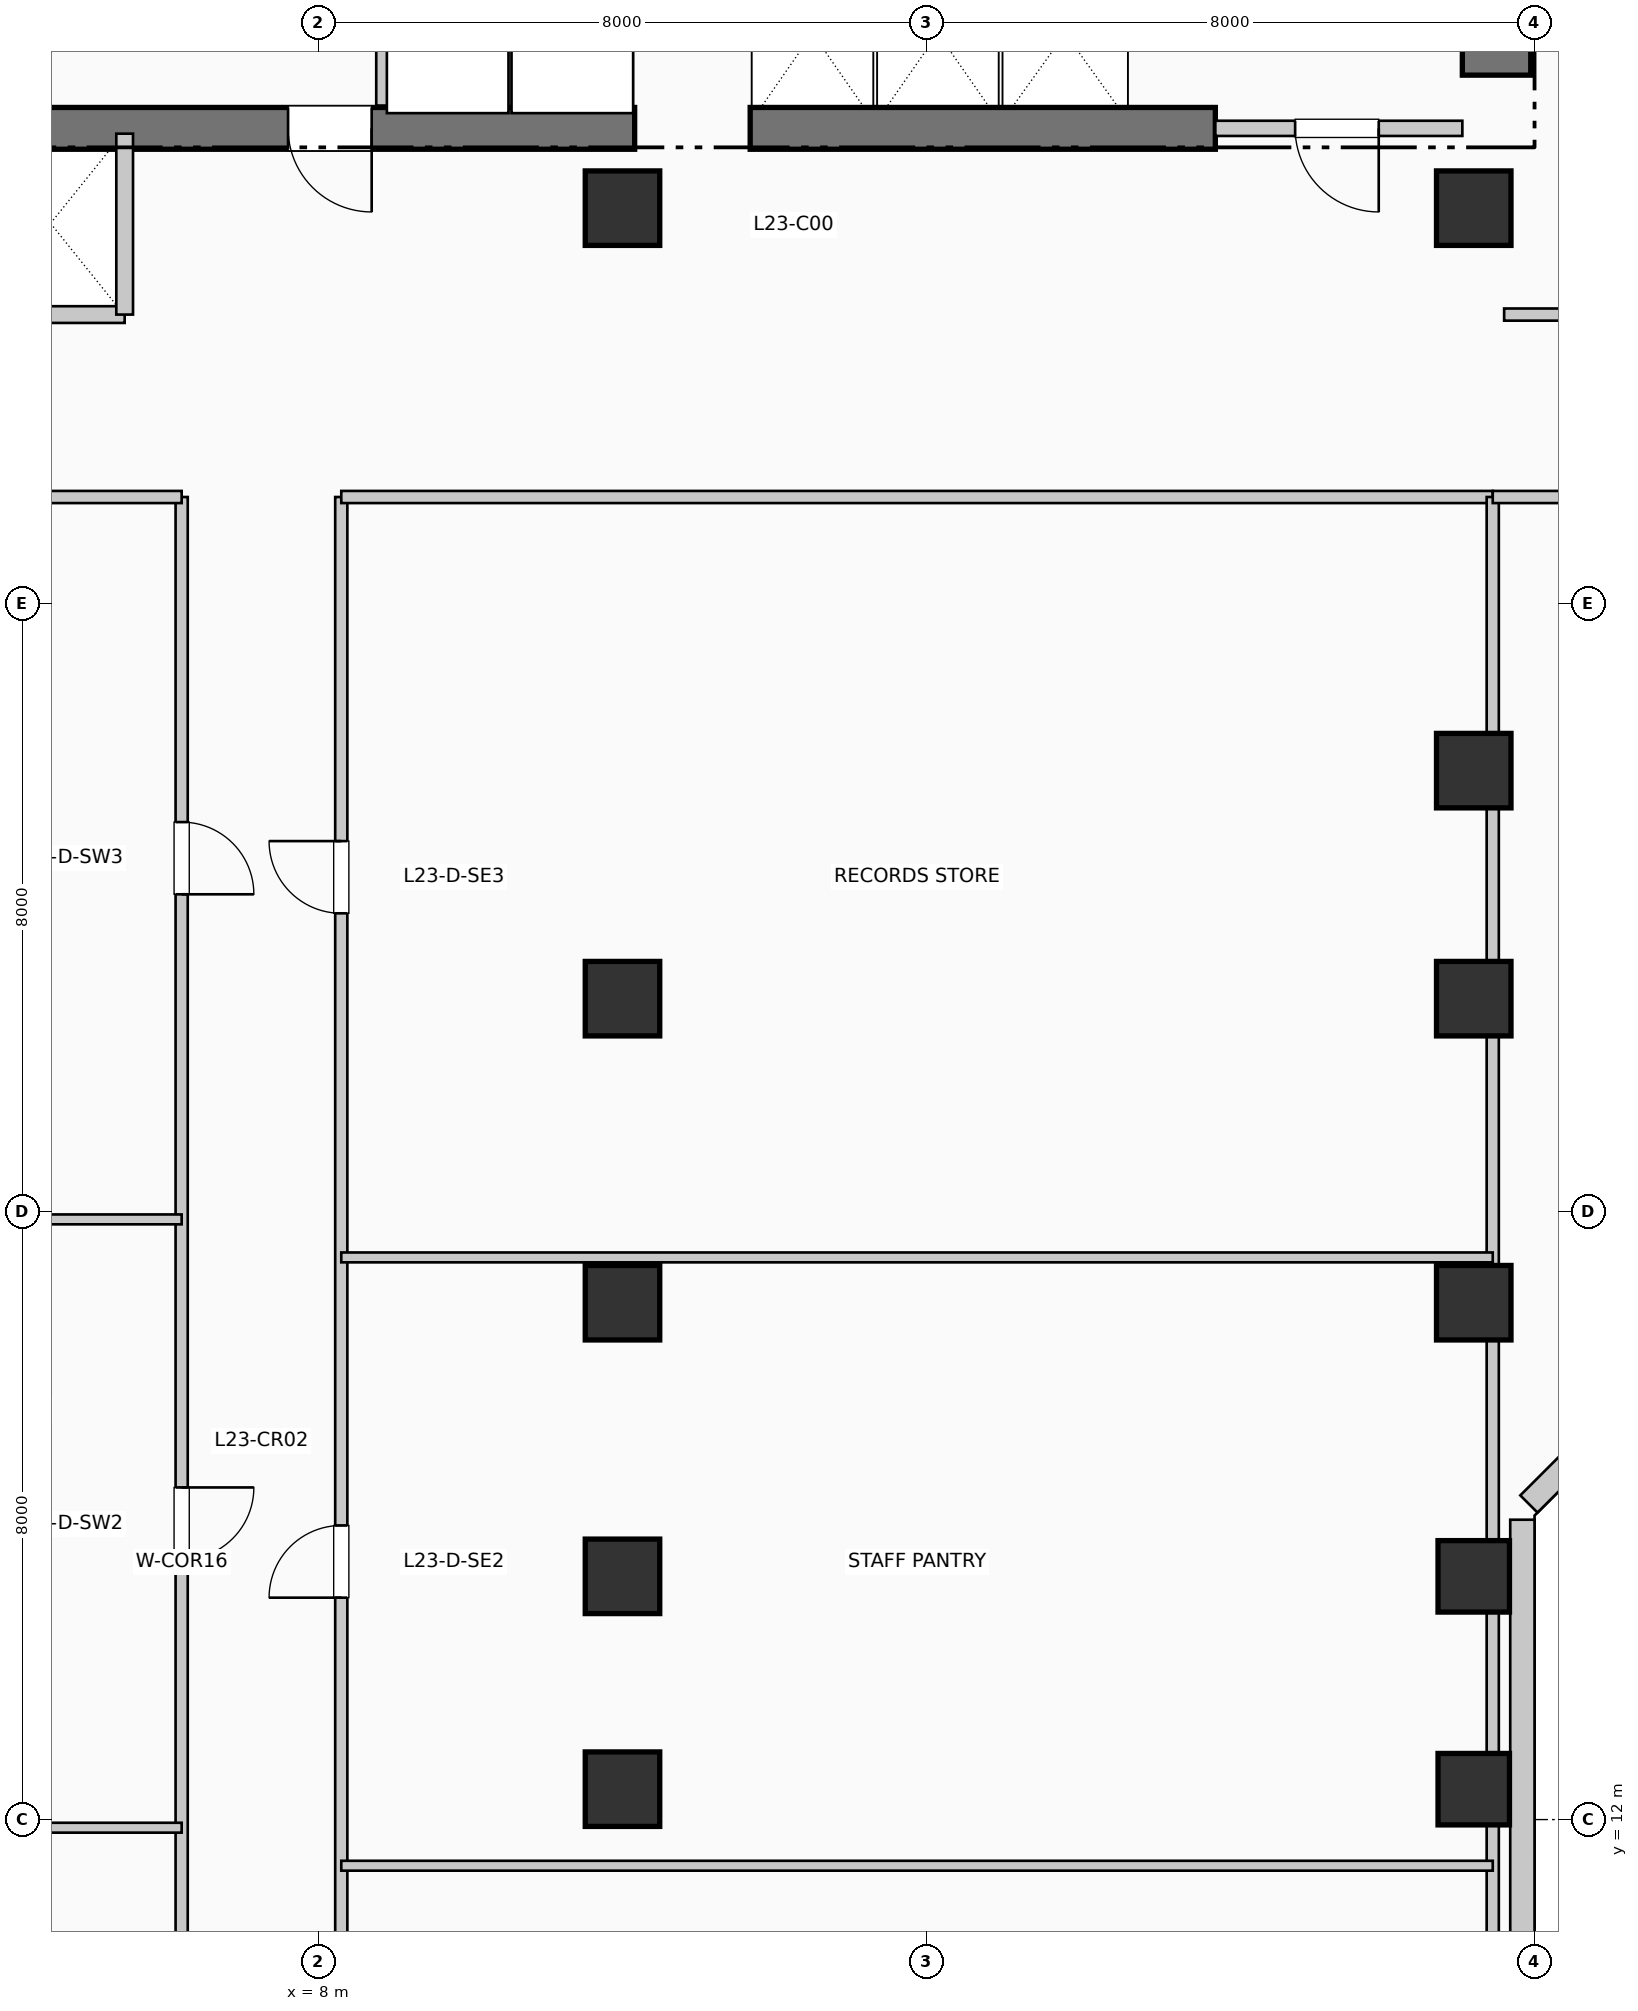
"""IFC4 building model, lengths in metres.
Left out: names, types, materials, properties, quantities, classifications, styles, units other than length and angle.
Written with IfcOpenShell. Run it as: python <this file> out.ifc"""

import sys

from ifc_helpers import new_model, si_unit, direction, frame, frame_2d, origin, origin_2d, place, context, subcontext, project, spatial, rectangle, extrude, element, fill, save


model = new_model("IFC4")
c1 = context("Model", 3, precision=1e-05, world=origin(), true_north=direction((0.0, 1.0)))
c2 = subcontext(c1, "Body", "Model", "MODEL_VIEW")
j1 = project(units=[si_unit("LENGTHUNIT", "METRE"), si_unit("PLANEANGLEUNIT", "RADIAN")], contexts=[c1])
p1 = place(None, origin())
s1 = spatial("IfcSite", under=j1, at=p1, CompositionType="ELEMENT")
p2 = place(p1, origin())
s2 = spatial("IfcBuilding", under=s1, at=p2, CompositionType="ELEMENT")
p3 = place(p2, frame((0.0, 0.0, 98.67)))
s3 = spatial("IfcBuildingStorey", under=s2, at=p3, CompositionType="ELEMENT", Elevation=98.67)
p4 = place(p3, frame((23.5, 34.95, 0.0), z_axis=(0.0, 0.0, 1.0), x_axis=(0.0, 1.0, 0.0)))
e1 = element("IfcWall", 1, at=p4, inside=s3, PredefinedType="SHEAR", context=c2, shape_type="SweptSolid", body=[
    extrude(rectangle(XDim=10.64, YDim=0.9, at=frame_2d((5.32, 0.0))), origin(), (0.0, 0.0, 1.0), 3.96),
])
p5 = place(p3, frame((1.45, 34.25, 0.0), z_axis=(0.0, 0.0, 1.0), x_axis=(1.0, 0.0, 0.0)))
e2 = element("IfcWall", 2, at=p5, inside=s3, PredefinedType="SHEAR", context=c2, shape_type="SweptSolid", body=[
    extrude(rectangle(XDim=10.71, YDim=0.55, at=frame_2d((5.355, 0.0))), origin(), (0.0, 0.0, 1.0), 3.96),
])
p6 = place(p5, frame((7.25, 0.0, 0.0), z_axis=(0.0, 0.0, 1.0), x_axis=(-1.0, 0.0, 0.0)))
e3 = element("IfcOpeningElement", 3, at=p6, cuts=e2, PredefinedType="OPENING", context=c2, shape_type="SweptSolid", body=[
    extrude(rectangle(XDim=1.1, YDim=2.15, at=frame_2d((0.55, 1.075))), frame((0.0, 0.285, 0.0), z_axis=(0.0, -1.0, 0.0), x_axis=(1.0, 0.0, 0.0)), (0.0, 0.0, 1.0), 0.57),
])
p7 = place(p3, frame((13.68, 34.25, 0.0), z_axis=(0.0, 0.0, 1.0), x_axis=(1.0, 0.0, 0.0)))
e4 = element("IfcWall", 4, at=p7, inside=s3, PredefinedType="SHEAR", context=c2, shape_type="SweptSolid", body=[
    extrude(rectangle(XDim=6.12, YDim=0.55, at=frame_2d((3.06, 0.0))), origin(), (0.0, 0.0, 1.0), 3.96),
])
for number, where, z_axis, x_axis in (
    (5, (12.0, 12.4, 0.0), (0.0, 0.0, 1.0), (1.0, 0.0, 0.0)),
    (6, (12.0, 15.2, 0.0), (0.0, 0.0, 1.0), (1.0, 0.0, 0.0)),
    (7, (12.0, 18.8, 0.0), (0.0, 0.0, 1.0), (1.0, 0.0, 0.0)),
    (8, (12.0, 22.8, 0.0), (0.0, 0.0, 1.0), (1.0, 0.0, 0.0)),
    (9, (12.0, 33.2, 0.0), (0.0, 0.0, 1.0), (1.0, 0.0, 0.0)),
):
    element("IfcColumn", number, at=place(p3, frame(where, z_axis=z_axis, x_axis=x_axis)), inside=s3, PredefinedType="COLUMN", context=c2, shape_type="SweptSolid", body=[
        extrude(rectangle(XDim=0.98, YDim=0.98, at=origin_2d()), origin(), (0.0, 0.0, 1.0), 3.96),
    ])
for number, where, z_axis, x_axis in (
    (10, (23.2, 12.4, 0.0), (0.0, 0.0, 1.0), (1.0, 0.0, 0.0)),
    (11, (23.2, 15.2, 0.0), (0.0, 0.0, 1.0), (1.0, 0.0, 0.0)),
):
    element("IfcColumn", number, at=place(p3, frame(where, z_axis=z_axis, x_axis=x_axis)), inside=s3, PredefinedType="COLUMN", context=c2, shape_type="SweptSolid", body=[
        extrude(rectangle(XDim=0.94, YDim=0.94, at=origin_2d()), origin(), (0.0, 0.0, 1.0), 3.96),
    ])
for number, where, z_axis, x_axis in (
    (12, (23.2, 18.8, 0.0), (0.0, 0.0, 1.0), (1.0, 0.0, 0.0)),
    (13, (23.2, 22.8, 0.0), (0.0, 0.0, 1.0), (1.0, 0.0, 0.0)),
    (14, (23.2, 25.8, 0.0), (0.0, 0.0, 1.0), (1.0, 0.0, 0.0)),
    (15, (23.2, 33.2, 0.0), (0.0, 0.0, 1.0), (1.0, 0.0, 0.0)),
):
    element("IfcColumn", number, at=place(p3, frame(where, z_axis=z_axis, x_axis=x_axis)), inside=s3, PredefinedType="COLUMN", context=c2, shape_type="SweptSolid", body=[
        extrude(rectangle(XDim=0.98, YDim=0.98, at=origin_2d()), origin(), (0.0, 0.0, 1.0), 3.96),
    ])
p8 = place(p3, frame((23.84, 3.055, 0.0), z_axis=(0.0, 0.0, 1.0), x_axis=(0.0, 1.0, 0.0)))
e16 = element("IfcWall", 16, at=p8, inside=s3, PredefinedType="SOLIDWALL", context=c2, shape_type="SweptSolid", body=[
    extrude(rectangle(XDim=12.89, YDim=0.32, at=frame_2d((6.445, 0.0))), origin(), (0.0, 0.0, 1.0), 3.71),
])
p9 = place(p3, frame((23.926, 16.152, 0.0), z_axis=(0.0, 0.0, 1.0), x_axis=(0.707106781187, 0.707106781187, 0.0)))
e17 = element("IfcWall", 17, at=p9, inside=s3, PredefinedType="SOLIDWALL", context=c2, shape_type="SweptSolid", body=[
    extrude(rectangle(XDim=2.718, YDim=0.32, at=frame_2d((1.359, 0.0))), origin(), (0.0, 0.0, 1.0), 3.71),
])
p10 = place(p3, frame((8.86, 34.55, 0.0), z_axis=(0.0, 0.0, 1.0), x_axis=(0.0, 1.0, 0.0)))
e18 = element("IfcWall", 18, at=p10, inside=s3, PredefinedType="PARTITIONING", context=c2, shape_type="SweptSolid", body=[
    extrude(rectangle(XDim=2.5, YDim=0.2, at=frame_2d((1.25, 0.0))), origin(), (0.0, 0.0, 1.0), 3.71),
])
p11 = place(p3, frame((19.8, 34.25, 0.0), z_axis=(0.0, 0.0, 1.0), x_axis=(1.0, 0.0, 0.0)))
e19 = element("IfcWall", 19, at=p11, inside=s3, PredefinedType="PARTITIONING", context=c2, shape_type="SweptSolid", body=[
    extrude(rectangle(XDim=3.25, YDim=0.2, at=frame_2d((1.625, 0.0))), origin(), (0.0, 0.0, 1.0), 3.71),
])
p12 = place(p11, frame((2.15, 0.0, 0.0), z_axis=(0.0, 0.0, 1.0), x_axis=(-1.0, 0.0, 0.0)))
e20 = element("IfcOpeningElement", 20, at=p12, cuts=e19, PredefinedType="OPENING", context=c2, shape_type="SweptSolid", body=[
    extrude(rectangle(XDim=1.1, YDim=2.15, at=frame_2d((0.55, 1.075))), frame((0.0, 0.11, 0.0), z_axis=(0.0, -1.0, 0.0), x_axis=(1.0, 0.0, 0.0)), (0.0, 0.0, 1.0), 0.22),
])
p13 = place(p3, frame((1.55, 31.8, 0.0), z_axis=(0.0, 0.0, 1.0), x_axis=(1.0, 0.0, 0.0)))
e21 = element("IfcWall", 21, at=p13, inside=s3, PredefinedType="PARTITIONING", context=c2, shape_type="SweptSolid", body=[
    extrude(rectangle(XDim=3.9, YDim=0.22, at=frame_2d((1.95, 0.0))), origin(), (0.0, 0.0, 1.0), 3.71),
])
p14 = place(p3, frame((5.45, 31.8, 0.0), z_axis=(0.0, 0.0, 1.0), x_axis=(0.0, 1.0, 0.0)))
e22 = element("IfcWall", 22, at=p14, inside=s3, PredefinedType="PARTITIONING", context=c2, shape_type="SweptSolid", body=[
    extrude(rectangle(XDim=2.38, YDim=0.22, at=frame_2d((1.19, 0.0))), origin(), (0.0, 0.0, 1.0), 3.71),
])
p15 = place(p3, frame((6.2, 4.39, 0.0), z_axis=(0.0, 0.0, 1.0), x_axis=(0.0, 1.0, 0.0)))
e23 = element("IfcWall", 23, at=p15, inside=s3, PredefinedType="PARTITIONING", context=c2, shape_type="SweptSolid", body=[
    extrude(rectangle(XDim=25.01, YDim=0.16, at=frame_2d((12.505, 0.0))), origin(), (0.0, 0.0, 1.0), 3.71),
])
p16 = place(p15, frame((4.227, 0.0, 0.0), z_axis=(0.0, 0.0, 1.0), x_axis=(-1.0, 0.0, 0.0)))
e24 = element("IfcOpeningElement", 24, at=p16, cuts=e23, PredefinedType="OPENING", context=c2, shape_type="SweptSolid", body=[
    extrude(rectangle(XDim=0.95, YDim=2.15, at=frame_2d((0.475, 1.075))), frame((0.0, 0.09, 0.0), z_axis=(0.0, -1.0, 0.0), x_axis=(1.0, 0.0, 0.0)), (0.0, 0.0, 1.0), 0.18),
])
p17 = place(p15, frame((11.979, 0.0, 0.0), z_axis=(0.0, 0.0, 1.0), x_axis=(-1.0, 0.0, 0.0)))
e25 = element("IfcOpeningElement", 25, at=p17, cuts=e23, PredefinedType="OPENING", context=c2, shape_type="SweptSolid", body=[
    extrude(rectangle(XDim=0.95, YDim=2.15, at=frame_2d((0.475, 1.075))), frame((0.0, 0.09, 0.0), z_axis=(0.0, -1.0, 0.0), x_axis=(1.0, 0.0, 0.0)), (0.0, 0.0, 1.0), 0.18),
])
p18 = place(p15, frame((20.733, 0.0, 0.0), z_axis=(0.0, 0.0, 1.0), x_axis=(-1.0, 0.0, 0.0)))
e26 = element("IfcOpeningElement", 26, at=p18, cuts=e23, PredefinedType="OPENING", context=c2, shape_type="SweptSolid", body=[
    extrude(rectangle(XDim=0.95, YDim=2.15, at=frame_2d((0.475, 1.075))), frame((0.0, 0.09, 0.0), z_axis=(0.0, -1.0, 0.0), x_axis=(1.0, 0.0, 0.0)), (0.0, 0.0, 1.0), 0.18),
])
p19 = place(p3, frame((8.3, 4.39, 0.0), z_axis=(0.0, 0.0, 1.0), x_axis=(0.0, 1.0, 0.0)))
e27 = element("IfcWall", 27, at=p19, inside=s3, PredefinedType="PARTITIONING", context=c2, shape_type="SweptSolid", body=[
    extrude(rectangle(XDim=25.01, YDim=0.16, at=frame_2d((12.505, 0.0))), origin(), (0.0, 0.0, 1.0), 3.71),
])
p20 = place(p19, frame((3.026, 0.0, 0.0)))
e28 = element("IfcOpeningElement", 28, at=p20, cuts=e27, PredefinedType="OPENING", context=c2, shape_type="SweptSolid", body=[
    extrude(rectangle(XDim=0.95, YDim=2.15, at=frame_2d((0.475, 1.075))), frame((0.0, 0.09, 0.0), z_axis=(0.0, -1.0, 0.0), x_axis=(1.0, 0.0, 0.0)), (0.0, 0.0, 1.0), 0.18),
])
p21 = place(p19, frame((10.529, 0.0, 0.0)))
e29 = element("IfcOpeningElement", 29, at=p21, cuts=e27, PredefinedType="OPENING", context=c2, shape_type="SweptSolid", body=[
    extrude(rectangle(XDim=0.95, YDim=2.15, at=frame_2d((0.475, 1.075))), frame((0.0, 0.09, 0.0), z_axis=(0.0, -1.0, 0.0), x_axis=(1.0, 0.0, 0.0)), (0.0, 0.0, 1.0), 0.18),
])
p22 = place(p19, frame((19.533, 0.0, 0.0)))
e30 = element("IfcOpeningElement", 30, at=p22, cuts=e27, PredefinedType="OPENING", context=c2, shape_type="SweptSolid", body=[
    extrude(rectangle(XDim=0.95, YDim=2.15, at=frame_2d((0.475, 1.075))), frame((0.0, 0.09, 0.0), z_axis=(0.0, -1.0, 0.0), x_axis=(1.0, 0.0, 0.0)), (0.0, 0.0, 1.0), 0.18),
])
p23 = place(p3, frame((0.19, 29.4, 0.0), z_axis=(0.0, 0.0, 1.0), x_axis=(1.0, 0.0, 0.0)))
e31 = element("IfcWall", 31, at=p23, inside=s3, PredefinedType="PARTITIONING", context=c2, shape_type="SweptSolid", body=[
    extrude(rectangle(XDim=6.01, YDim=0.16, at=frame_2d((3.005, 0.0))), origin(), (0.0, 0.0, 1.0), 3.365),
])
p24 = place(p3, frame((8.3, 29.4, 0.0), z_axis=(0.0, 0.0, 1.0), x_axis=(1.0, 0.0, 0.0)))
e32 = element("IfcWall", 32, at=p24, inside=s3, PredefinedType="PARTITIONING", context=c2, shape_type="SweptSolid", body=[
    extrude(rectangle(XDim=15.15, YDim=0.16, at=frame_2d((7.575, 0.0))), origin(), (0.0, 0.0, 1.0), 3.365),
])
p25 = place(p3, frame((23.45, 0.19, 0.0), z_axis=(0.0, 0.0, 1.0), x_axis=(0.0, 1.0, 0.0)))
e33 = element("IfcWall", 33, at=p25, inside=s3, PredefinedType="PARTITIONING", context=c2, shape_type="SweptSolid", body=[
    extrude(rectangle(XDim=29.21, YDim=0.16, at=frame_2d((14.605, 0.0))), origin(), (0.0, 0.0, 1.0), 2.995),
])
for number, where, z_axis, x_axis in (
    (34, (0.19, 11.893, 0.0), (0.0, 0.0, 1.0), (1.0, 0.0, 0.0)),
    (35, (0.19, 19.896, 0.0), (0.0, 0.0, 1.0), (1.0, 0.0, 0.0)),
):
    element("IfcWall", number, at=place(p3, frame(where, z_axis=z_axis, x_axis=x_axis)), inside=s3, PredefinedType="PARTITIONING", context=c2, shape_type="SweptSolid", body=[
        extrude(rectangle(XDim=6.01, YDim=0.13, at=frame_2d((3.005, 0.0))), origin(), (0.0, 0.0, 1.0), 3.71),
    ])
for number, where, z_axis, x_axis in (
    (36, (8.3, 11.393, 0.0), (0.0, 0.0, 1.0), (1.0, 0.0, 0.0)),
    (37, (8.3, 19.396, 0.0), (0.0, 0.0, 1.0), (1.0, 0.0, 0.0)),
):
    element("IfcWall", number, at=place(p3, frame(where, z_axis=z_axis, x_axis=x_axis)), inside=s3, PredefinedType="PARTITIONING", context=c2, shape_type="SweptSolid", body=[
        extrude(rectangle(XDim=15.15, YDim=0.13, at=frame_2d((7.575, 0.0))), origin(), (0.0, 0.0, 1.0), 3.71),
    ])
p26 = place(p3, frame((23.45, 29.4, 0.0), z_axis=(0.0, 0.0, 1.0), x_axis=(1.0, 0.0, 0.0)))
e38 = element("IfcWall", 38, at=p26, inside=s3, PredefinedType="PARTITIONING", context=c2, shape_type="SweptSolid", body=[
    extrude(rectangle(XDim=32.36, YDim=0.16, at=frame_2d((16.18, 0.0))), origin(), (0.0, 0.0, 1.0), 3.365),
])
p27 = place(p26, frame((7.271, 0.0, 0.0), z_axis=(0.0, 0.0, 1.0), x_axis=(-1.0, 0.0, 0.0)))
e39 = element("IfcOpeningElement", 39, at=p27, cuts=e38, PredefinedType="OPENING", context=c2, shape_type="SweptSolid", body=[
    extrude(rectangle(XDim=0.95, YDim=2.15, at=frame_2d((0.475, 1.075))), frame((0.0, 0.09, 0.0), z_axis=(0.0, -1.0, 0.0), x_axis=(1.0, 0.0, 0.0)), (0.0, 0.0, 1.0), 0.18),
])
p28 = place(p26, frame((23.45, 0.0, 0.0), z_axis=(0.0, 0.0, 1.0), x_axis=(-1.0, 0.0, 0.0)))
e40 = element("IfcOpeningElement", 40, at=p28, cuts=e38, PredefinedType="OPENING", context=c2, shape_type="SweptSolid", body=[
    extrude(rectangle(XDim=0.95, YDim=2.15, at=frame_2d((0.475, 1.075))), frame((0.0, 0.09, 0.0), z_axis=(0.0, -1.0, 0.0), x_axis=(1.0, 0.0, 0.0)), (0.0, 0.0, 1.0), 0.18),
])
p29 = place(p3, frame((23.6, 31.8, 0.0), z_axis=(0.0, 0.0, 1.0), x_axis=(1.0, 0.0, 0.0)))
e41 = element("IfcWall", 41, at=p29, inside=s3, PredefinedType="PARTITIONING", context=c2, shape_type="SweptSolid", body=[
    extrude(rectangle(XDim=32.21, YDim=0.16, at=frame_2d((16.105, 0.0))), origin(), (0.0, 0.0, 1.0), 3.71),
])
p30 = place(p29, frame((3.712, 0.0, 0.0)))
e42 = element("IfcOpeningElement", 42, at=p30, cuts=e41, PredefinedType="OPENING", context=c2, shape_type="SweptSolid", body=[
    extrude(rectangle(XDim=0.95, YDim=2.15, at=frame_2d((0.475, 1.075))), frame((0.0, 0.09, 0.0), z_axis=(0.0, -1.0, 0.0), x_axis=(1.0, 0.0, 0.0)), (0.0, 0.0, 1.0), 0.18),
])
p31 = place(p29, frame((12.731, 0.0, 0.0)))
e43 = element("IfcOpeningElement", 43, at=p31, cuts=e41, PredefinedType="OPENING", context=c2, shape_type="SweptSolid", body=[
    extrude(rectangle(XDim=0.95, YDim=2.15, at=frame_2d((0.475, 1.075))), frame((0.0, 0.09, 0.0), z_axis=(0.0, -1.0, 0.0), x_axis=(1.0, 0.0, 0.0)), (0.0, 0.0, 1.0), 0.18),
])
p32 = place(p29, frame((21.589, 0.0, 0.0)))
e44 = element("IfcOpeningElement", 44, at=p32, cuts=e41, PredefinedType="OPENING", context=c2, shape_type="SweptSolid", body=[
    extrude(rectangle(XDim=0.95, YDim=2.15, at=frame_2d((0.475, 1.075))), frame((0.0, 0.09, 0.0), z_axis=(0.0, -1.0, 0.0), x_axis=(1.0, 0.0, 0.0)), (0.0, 0.0, 1.0), 0.18),
])
p33 = place(p29, frame((28.675, 0.0, 0.0)))
e45 = element("IfcOpeningElement", 45, at=p33, cuts=e41, PredefinedType="OPENING", context=c2, shape_type="SweptSolid", body=[
    extrude(rectangle(XDim=0.95, YDim=2.15, at=frame_2d((0.475, 1.075))), frame((0.0, 0.09, 0.0), z_axis=(0.0, -1.0, 0.0), x_axis=(1.0, 0.0, 0.0)), (0.0, 0.0, 1.0), 0.18),
])
p34 = place(p6, origin())
e46 = element("IfcDoor", 46, at=p34, inside=s3, OperationType="SINGLE_SWING_RIGHT", PredefinedType="DOOR", context=c2, shape_type="SweptSolid", body=[
    extrude(rectangle(XDim=1.1, YDim=2.15, at=frame_2d((0.55, 1.075))), frame((0.0, 0.025, 0.0), z_axis=(0.0, -1.0, 0.0), x_axis=(1.0, 0.0, 0.0)), (0.0, 0.0, 1.0), 0.05),
])
fill(e3, e46)
p35 = place(p12, origin())
e47 = element("IfcDoor", 47, at=p35, inside=s3, OperationType="SINGLE_SWING_RIGHT", PredefinedType="DOOR", context=c2, shape_type="SweptSolid", body=[
    extrude(rectangle(XDim=1.1, YDim=2.15, at=frame_2d((0.55, 1.075))), frame((0.0, 0.025, 0.0), z_axis=(0.0, -1.0, 0.0), x_axis=(1.0, 0.0, 0.0)), (0.0, 0.0, 1.0), 0.05),
])
fill(e20, e47)
p36 = place(p17, origin())
e48 = element("IfcDoor", 48, at=p36, inside=s3, OperationType="SINGLE_SWING_RIGHT", PredefinedType="DOOR", context=c2, shape_type="SweptSolid", body=[
    extrude(rectangle(XDim=0.95, YDim=2.15, at=frame_2d((0.475, 1.075))), frame((0.0, 0.025, 0.0), z_axis=(0.0, -1.0, 0.0), x_axis=(1.0, 0.0, 0.0)), (0.0, 0.0, 1.0), 0.05),
])
fill(e25, e48)
p37 = place(p18, origin())
e49 = element("IfcDoor", 49, at=p37, inside=s3, OperationType="SINGLE_SWING_LEFT", PredefinedType="DOOR", context=c2, shape_type="SweptSolid", body=[
    extrude(rectangle(XDim=0.95, YDim=2.15, at=frame_2d((0.475, 1.075))), frame((0.0, 0.025, 0.0), z_axis=(0.0, -1.0, 0.0), x_axis=(1.0, 0.0, 0.0)), (0.0, 0.0, 1.0), 0.05),
])
fill(e26, e49)
p38 = place(p21, origin())
e50 = element("IfcDoor", 50, at=p38, inside=s3, OperationType="SINGLE_SWING_LEFT", PredefinedType="DOOR", context=c2, shape_type="SweptSolid", body=[
    extrude(rectangle(XDim=0.95, YDim=2.15, at=frame_2d((0.475, 1.075))), frame((0.0, 0.025, 0.0), z_axis=(0.0, -1.0, 0.0), x_axis=(1.0, 0.0, 0.0)), (0.0, 0.0, 1.0), 0.05),
])
fill(e29, e50)
p39 = place(p22, origin())
e51 = element("IfcDoor", 51, at=p39, inside=s3, OperationType="SINGLE_SWING_RIGHT", PredefinedType="DOOR", context=c2, shape_type="SweptSolid", body=[
    extrude(rectangle(XDim=0.95, YDim=2.15, at=frame_2d((0.475, 1.075))), frame((0.0, 0.025, 0.0), z_axis=(0.0, -1.0, 0.0), x_axis=(1.0, 0.0, 0.0)), (0.0, 0.0, 1.0), 0.05),
])
fill(e30, e51)
save(model, sys.argv[1])
